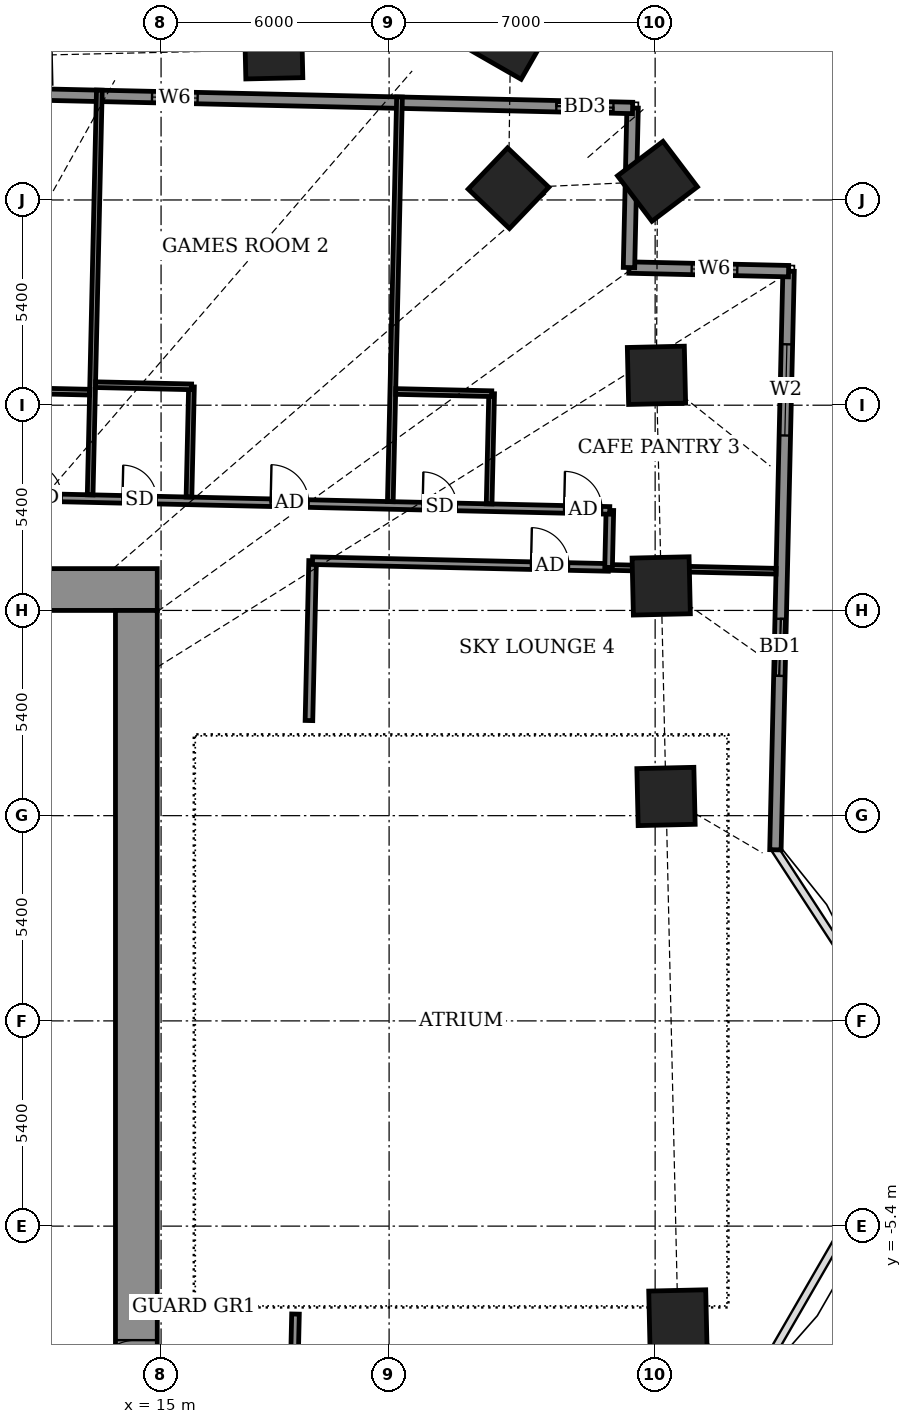
"""IFC4 building model, lengths in metres.
Left out: names, types, materials, properties, quantities, classifications, styles, units other than length and angle.
Written with IfcOpenShell. Run it as: python <this file> out.ifc"""

import sys

from ifc_helpers import new_model, si_unit, direction, frame, frame_2d, origin, origin_2d, place, context, subcontext, project, spatial, rectangle, extrude, element, fill, save


model = new_model("IFC4")
c1 = context("Model", 3, precision=1e-05, world=origin(), true_north=direction((0.0, 1.0)))
c2 = subcontext(c1, "Body", "Model", "MODEL_VIEW")
j1 = project(units=[si_unit("LENGTHUNIT", "METRE"), si_unit("PLANEANGLEUNIT", "RADIAN")], contexts=[c1])
p1 = place(None, origin())
s1 = spatial("IfcSite", under=j1, at=p1, CompositionType="ELEMENT")
p2 = place(p1, origin())
s2 = spatial("IfcBuilding", under=s1, at=p2, CompositionType="ELEMENT")
p3 = place(p2, frame((0.0, 0.0, 52.1)))
s3 = spatial("IfcBuildingStorey", under=s2, at=p3, CompositionType="ELEMENT", Elevation=52.1)
for number, where, z_axis, x_axis in (
    (1, (28.598, -7.842, -0.55), (0.0, 0.0, 1.0), (-0.023, 1.0, 0.0)),
    (2, (28.286, 5.905, -0.55), (0.0, 0.0, 1.0), (-0.023, 1.0, 0.0)),
    (3, (28.16, 11.445, -0.55), (0.0, 0.0, 1.0), (-0.023, 1.0, 0.0)),
    (4, (28.035, 16.986, -0.55), (0.0, 0.0, 1.0), (-0.023, 1.0, 0.0)),
    (5, (28.061, 22.09, -0.55), (0.0, 0.0, 1.0), (-0.604, 0.797, 0.0)),
    (6, (24.142, 21.91, -0.55), (0.0, 0.0, 1.0), (-0.723, 0.691, 0.0)),
    (7, (24.196, 25.8, -0.55), (0.0, 0.0, 1.0), (-0.868, 0.497, 0.0)),
    (8, (17.963, 25.551, -0.55), (0.0, 0.0, 1.0), (-1.0, -0.023, 0.0)),
):
    element("IfcColumn", number, at=place(p3, frame(where, z_axis=z_axis, x_axis=x_axis)), inside=s3, PredefinedType="COLUMN", context=c2, shape_type="SweptSolid", body=[
        extrude(rectangle(XDim=1.5, YDim=1.5, at=origin_2d()), origin(), (0.0, 0.0, 1.0), 4.6),
    ])
p4 = place(p3, frame((31.165, 4.502, 0.0), z_axis=(0.0, 0.0, 1.0), x_axis=(0.022716307128, 0.999741951401, 0.0)))
e9 = element("IfcWall", 9, at=p4, inside=s3, PredefinedType="SOLIDWALL", context=c2, shape_type="SweptSolid", body=[
    extrude(rectangle(XDim=15.229, YDim=0.3, at=frame_2d((7.615, 0.0))), origin(), (0.0, 0.0, 1.0), 2.45),
])
p5 = place(p4, frame((4.578, 0.0, 0.0)))
e10 = element("IfcOpeningElement", 10, at=p5, cuts=e9, PredefinedType="OPENING", context=c2, shape_type="SweptSolid", body=[
    extrude(rectangle(XDim=1.5, YDim=2.4, at=frame_2d((0.75, 1.2))), frame((0.0, 0.16, 0.0), z_axis=(0.0, -1.0, 0.0), x_axis=(1.0, 0.0, 0.0)), (0.0, 0.0, 1.0), 0.32),
])
p6 = place(p4, frame((10.904, 0.0, 0.9)))
e11 = element("IfcOpeningElement", 11, at=p6, cuts=e9, PredefinedType="OPENING", context=c2, shape_type="SweptSolid", body=[
    extrude(rectangle(XDim=2.4, YDim=1.5, at=frame_2d((1.2, 0.75))), frame((0.0, 0.16, 0.0), z_axis=(0.0, -1.0, 0.0), x_axis=(1.0, 0.0, 0.0)), (0.0, 0.0, 1.0), 0.32),
])
p7 = place(p3, frame((31.511, 19.727, 0.0), z_axis=(0.0, 0.0, 1.0), x_axis=(-0.999744320311, 0.022611811187, 0.0)))
e12 = element("IfcWall", 12, at=p7, inside=s3, PredefinedType="SOLIDWALL", context=c2, shape_type="SweptSolid", body=[
    extrude(rectangle(XDim=4.2, YDim=0.3, at=frame_2d((2.1, 0.0))), origin(), (0.0, 0.0, 1.0), 2.35),
])
p8 = place(p7, frame((1.35, 0.0, 0.5)))
e13 = element("IfcOpeningElement", 13, at=p8, cuts=e12, PredefinedType="OPENING", context=c2, shape_type="SweptSolid", body=[
    extrude(rectangle(XDim=1.2, YDim=1.1, at=frame_2d((0.6, 0.55))), frame((0.0, 0.16, 0.0), z_axis=(0.0, -1.0, 0.0), x_axis=(1.0, 0.0, 0.0)), (0.0, 0.0, 1.0), 0.32),
])
p9 = place(p3, frame((27.312, 19.822, 0.0), z_axis=(0.0, 0.0, 1.0), x_axis=(0.022611811187, 0.999744320311, 0.0)))
e14 = element("IfcWall", 14, at=p9, inside=s3, PredefinedType="SOLIDWALL", context=c2, shape_type="SweptSolid", body=[
    extrude(rectangle(XDim=4.2, YDim=0.3, at=frame_2d((2.1, 0.0))), origin(), (0.0, 0.0, 1.0), 2.35),
])
p10 = place(p3, frame((27.407, 24.021, 0.0), z_axis=(0.0, 0.0, 1.0), x_axis=(-0.999742614779, 0.02268709312, 0.0)))
e15 = element("IfcWall", 15, at=p10, inside=s3, PredefinedType="SOLIDWALL", context=c2, shape_type="SweptSolid", body=[
    extrude(rectangle(XDim=49.943, YDim=0.3, at=frame_2d((24.971, 0.0))), origin(), (0.0, 0.0, 1.0), 2.25),
])
p11 = place(p10, frame((0.506, 0.0, 0.0)))
e16 = element("IfcOpeningElement", 16, at=p11, cuts=e15, PredefinedType="OPENING", context=c2, shape_type="SweptSolid", body=[
    extrude(rectangle(XDim=1.5, YDim=2.0, at=frame_2d((0.75, 1.0))), frame((0.0, 0.16, 0.0), z_axis=(0.0, -1.0, 0.0), x_axis=(1.0, 0.0, 0.0)), (0.0, 0.0, 1.0), 0.32),
])
p12 = place(p10, frame((11.448, 0.0, 0.5)))
e17 = element("IfcOpeningElement", 17, at=p12, cuts=e15, PredefinedType="OPENING", context=c2, shape_type="SweptSolid", body=[
    extrude(rectangle(XDim=1.2, YDim=1.1, at=frame_2d((0.6, 0.55))), frame((0.0, 0.16, 0.0), z_axis=(0.0, -1.0, 0.0), x_axis=(1.0, 0.0, 0.0)), (0.0, 0.0, 1.0), 0.32),
])
p13 = place(p10, frame((18.804, 0.0, 0.5)))
e18 = element("IfcOpeningElement", 18, at=p13, cuts=e15, PredefinedType="OPENING", context=c2, shape_type="SweptSolid", body=[
    extrude(rectangle(XDim=1.2, YDim=1.1, at=frame_2d((0.6, 0.55))), frame((0.0, 0.16, 0.0), z_axis=(0.0, -1.0, 0.0), x_axis=(1.0, 0.0, 0.0)), (0.0, 0.0, 1.0), 0.32),
])
p14 = place(p10, frame((24.891, 0.0, 0.0)))
e19 = element("IfcOpeningElement", 19, at=p14, cuts=e15, PredefinedType="OPENING", context=c2, shape_type="SweptSolid", body=[
    extrude(rectangle(XDim=1.5, YDim=2.0, at=frame_2d((0.75, 1.0))), frame((0.0, 0.16, 0.0), z_axis=(0.0, -1.0, 0.0), x_axis=(1.0, 0.0, 0.0)), (0.0, 0.0, 1.0), 0.32),
])
p15 = place(p10, frame((30.75, 0.0, 0.0)))
e20 = element("IfcOpeningElement", 20, at=p15, cuts=e15, PredefinedType="OPENING", context=c2, shape_type="SweptSolid", body=[
    extrude(rectangle(XDim=1.5, YDim=2.0, at=frame_2d((0.75, 1.0))), frame((0.0, 0.16, 0.0), z_axis=(0.0, -1.0, 0.0), x_axis=(1.0, 0.0, 0.0)), (0.0, 0.0, 1.0), 0.32),
])
p16 = place(p10, frame((38.209, 0.0, 0.5)))
e21 = element("IfcOpeningElement", 21, at=p16, cuts=e15, PredefinedType="OPENING", context=c2, shape_type="SweptSolid", body=[
    extrude(rectangle(XDim=1.2, YDim=1.1, at=frame_2d((0.6, 0.55))), frame((0.0, 0.16, 0.0), z_axis=(0.0, -1.0, 0.0), x_axis=(1.0, 0.0, 0.0)), (0.0, 0.0, 1.0), 0.32),
])
p17 = place(p10, frame((45.277, 0.0, 0.5)))
e22 = element("IfcOpeningElement", 22, at=p17, cuts=e15, PredefinedType="OPENING", context=c2, shape_type="SweptSolid", body=[
    extrude(rectangle(XDim=1.2, YDim=1.1, at=frame_2d((0.6, 0.55))), frame((0.0, 0.16, 0.0), z_axis=(0.0, -1.0, 0.0), x_axis=(1.0, 0.0, 0.0)), (0.0, 0.0, 1.0), 0.32),
])
p18 = place(p3, frame((18.384, -14.434, 0.0), z_axis=(0.0, 0.0, 1.0), x_axis=(0.022773383809, 0.999740652864, 0.0)))
e23 = element("IfcWall", 23, at=p18, inside=s3, PredefinedType="PARTITIONING", context=c2, shape_type="SweptSolid", body=[
    extrude(rectangle(XDim=6.722, YDim=0.2, at=frame_2d((3.361, 0.0))), origin(), (0.0, 0.0, 1.0), 2.25),
])
p19 = place(p3, frame((18.891, 7.903, 0.0), z_axis=(0.0, 0.0, 1.0), x_axis=(0.022807092041, 0.999739884446, 0.0)))
e24 = element("IfcWall", 24, at=p19, inside=s3, PredefinedType="PARTITIONING", context=c2, shape_type="SweptSolid", body=[
    extrude(rectangle(XDim=4.207, YDim=0.2, at=frame_2d((2.104, 0.0))), origin(), (0.0, 0.0, 1.0), 2.45),
])
p20 = place(p3, frame((18.985, 12.109, 0.0), z_axis=(0.0, 0.0, 1.0), x_axis=(0.999741689867, -0.022727814278, 0.0)))
e25 = element("IfcWall", 25, at=p20, inside=s3, PredefinedType="PARTITIONING", context=c2, shape_type="SweptSolid", body=[
    extrude(rectangle(XDim=7.788, YDim=0.2, at=frame_2d((3.894, 0.0))), origin(), (0.0, 0.0, 1.0), 2.45),
])
p21 = place(p20, frame((5.75, 0.0, 0.0)))
e26 = element("IfcOpeningElement", 26, at=p21, cuts=e25, PredefinedType="OPENING", context=c2, shape_type="SweptSolid", body=[
    extrude(rectangle(XDim=1.0, YDim=2.1, at=frame_2d((0.5, 1.05))), frame((0.0, 0.11, 0.0), z_axis=(0.0, -1.0, 0.0), x_axis=(1.0, 0.0, 0.0)), (0.0, 0.0, 1.0), 0.22),
])
p22 = place(p3, frame((26.771, 11.932, 0.0), z_axis=(0.0, 0.0, 1.0), x_axis=(0.999743859858, -0.022632160219, 0.0)))
e27 = element("IfcWall", 27, at=p22, inside=s3, PredefinedType="PARTITIONING", context=c2, shape_type="SweptSolid", body=[
    extrude(rectangle(XDim=4.412, YDim=0.15, at=frame_2d((2.206, 0.0))), origin(), (0.0, 0.0, 1.0), 4.05),
])
p23 = place(p3, frame((26.775, 11.932, 0.0), z_axis=(0.0, 0.0, 1.0), x_axis=(0.022780545013, 0.999740489712, 0.0)))
e28 = element("IfcWall", 28, at=p23, inside=s3, PredefinedType="PARTITIONING", context=c2, shape_type="SweptSolid", body=[
    extrude(rectangle(XDim=1.5, YDim=0.2, at=frame_2d((0.75, 0.0))), origin(), (0.0, 0.0, 1.0), 4.05),
])
p24 = place(p3, frame((-26.206, 14.635, 0.0), z_axis=(0.0, 0.0, 1.0), x_axis=(0.999742550532, -0.022689924097, 0.0)))
e29 = element("IfcWall", 29, at=p24, inside=s3, PredefinedType="PARTITIONING", context=c2, shape_type="SweptSolid", body=[
    extrude(rectangle(XDim=53.025, YDim=0.2, at=frame_2d((26.512, 0.0))), origin(), (0.0, 0.0, 1.0), 2.1),
])
p25 = place(p24, frame((51.824, 0.0, 0.0)))
e30 = element("IfcOpeningElement", 30, at=p25, cuts=e29, PredefinedType="OPENING", context=c2, shape_type="SweptSolid", body=[
    extrude(rectangle(XDim=1.0, YDim=2.1, at=frame_2d((0.5, 1.05))), frame((0.0, 0.11, 0.0), z_axis=(0.0, -1.0, 0.0), x_axis=(1.0, 0.0, 0.0)), (0.0, 0.0, 1.0), 0.22),
])
p26 = place(p24, frame((48.1, 0.0, 0.0)))
e31 = element("IfcOpeningElement", 31, at=p26, cuts=e29, PredefinedType="OPENING", context=c2, shape_type="SweptSolid", body=[
    extrude(rectangle(XDim=0.9, YDim=2.1, at=frame_2d((0.45, 1.05))), frame((0.0, 0.11, 0.0), z_axis=(0.0, -1.0, 0.0), x_axis=(1.0, 0.0, 0.0)), (0.0, 0.0, 1.0), 0.22),
])
p27 = place(p24, frame((44.1, 0.0, 0.0)))
e32 = element("IfcOpeningElement", 32, at=p27, cuts=e29, PredefinedType="OPENING", context=c2, shape_type="SweptSolid", body=[
    extrude(rectangle(XDim=1.0, YDim=2.1, at=frame_2d((0.5, 1.05))), frame((0.0, 0.11, 0.0), z_axis=(0.0, -1.0, 0.0), x_axis=(1.0, 0.0, 0.0)), (0.0, 0.0, 1.0), 0.22),
])
p28 = place(p24, frame((40.2, 0.0, 0.0)))
e33 = element("IfcOpeningElement", 33, at=p28, cuts=e29, PredefinedType="OPENING", context=c2, shape_type="SweptSolid", body=[
    extrude(rectangle(XDim=0.9, YDim=2.1, at=frame_2d((0.45, 1.05))), frame((0.0, 0.11, 0.0), z_axis=(0.0, -1.0, 0.0), x_axis=(1.0, 0.0, 0.0)), (0.0, 0.0, 1.0), 0.22),
])
p29 = place(p24, frame((33.175, 0.0, 0.0)))
e34 = element("IfcOpeningElement", 34, at=p29, cuts=e29, PredefinedType="OPENING", context=c2, shape_type="SweptSolid", body=[
    extrude(rectangle(XDim=1.0, YDim=2.1, at=frame_2d((0.5, 1.05))), frame((0.0, 0.11, 0.0), z_axis=(0.0, -1.0, 0.0), x_axis=(1.0, 0.0, 0.0)), (0.0, 0.0, 1.0), 0.22),
])
p30 = place(p24, frame((37.7, 0.0, 0.0)))
e35 = element("IfcOpeningElement", 35, at=p30, cuts=e29, PredefinedType="OPENING", context=c2, shape_type="SweptSolid", body=[
    extrude(rectangle(XDim=0.9, YDim=2.1, at=frame_2d((0.45, 1.05))), frame((0.0, 0.11, 0.0), z_axis=(0.0, -1.0, 0.0), x_axis=(1.0, 0.0, 0.0)), (0.0, 0.0, 1.0), 0.22),
])
p31 = place(p24, frame((28.625, 0.0, 0.0)))
e36 = element("IfcOpeningElement", 36, at=p31, cuts=e29, PredefinedType="OPENING", context=c2, shape_type="SweptSolid", body=[
    extrude(rectangle(XDim=0.9, YDim=2.1, at=frame_2d((0.45, 1.05))), frame((0.0, 0.11, 0.0), z_axis=(0.0, -1.0, 0.0), x_axis=(1.0, 0.0, 0.0)), (0.0, 0.0, 1.0), 0.22),
])
p32 = place(p24, frame((21.15, 0.0, 0.0)))
e37 = element("IfcOpeningElement", 37, at=p32, cuts=e29, PredefinedType="OPENING", context=c2, shape_type="SweptSolid", body=[
    extrude(rectangle(XDim=0.9, YDim=2.1, at=frame_2d((0.45, 1.05))), frame((0.0, 0.11, 0.0), z_axis=(0.0, -1.0, 0.0), x_axis=(1.0, 0.0, 0.0)), (0.0, 0.0, 1.0), 0.22),
])
p33 = place(p24, frame((17.075, 0.0, 0.0)))
e38 = element("IfcOpeningElement", 38, at=p33, cuts=e29, PredefinedType="OPENING", context=c2, shape_type="SweptSolid", body=[
    extrude(rectangle(XDim=1.0, YDim=2.1, at=frame_2d((0.5, 1.05))), frame((0.0, 0.11, 0.0), z_axis=(0.0, -1.0, 0.0), x_axis=(1.0, 0.0, 0.0)), (0.0, 0.0, 1.0), 0.22),
])
p34 = place(p24, frame((13.15, 0.0, 0.0)))
e39 = element("IfcOpeningElement", 39, at=p34, cuts=e29, PredefinedType="OPENING", context=c2, shape_type="SweptSolid", body=[
    extrude(rectangle(XDim=0.9, YDim=2.1, at=frame_2d((0.45, 1.05))), frame((0.0, 0.11, 0.0), z_axis=(0.0, -1.0, 0.0), x_axis=(1.0, 0.0, 0.0)), (0.0, 0.0, 1.0), 0.22),
])
p35 = place(p24, frame((3.65, 0.0, 0.0)))
e40 = element("IfcOpeningElement", 40, at=p35, cuts=e29, PredefinedType="OPENING", context=c2, shape_type="SweptSolid", body=[
    extrude(rectangle(XDim=1.0, YDim=2.1, at=frame_2d((0.5, 1.05))), frame((0.0, 0.11, 0.0), z_axis=(0.0, -1.0, 0.0), x_axis=(1.0, 0.0, 0.0)), (0.0, 0.0, 1.0), 0.22),
])
p36 = place(p24, frame((10.55, 0.0, 0.0)))
e41 = element("IfcOpeningElement", 41, at=p36, cuts=e29, PredefinedType="OPENING", context=c2, shape_type="SweptSolid", body=[
    extrude(rectangle(XDim=0.9, YDim=2.1, at=frame_2d((0.45, 1.05))), frame((0.0, 0.11, 0.0), z_axis=(0.0, -1.0, 0.0), x_axis=(1.0, 0.0, 0.0)), (0.0, 0.0, 1.0), 0.22),
])
p37 = place(p3, frame((13.134, 13.842, 0.0), z_axis=(0.0, 0.0, 1.0), x_axis=(0.022716198383, 0.999741953872, 0.0)))
e42 = element("IfcWall", 42, at=p37, inside=s3, PredefinedType="PARTITIONING", context=c2, shape_type="SweptSolid", body=[
    extrude(rectangle(XDim=10.651, YDim=0.15, at=frame_2d((5.325, 0.0))), origin(), (0.0, 0.0, 1.0), 2.25),
])
p38 = place(p3, frame((15.734, 13.783, 0.0), z_axis=(0.0, 0.0, 1.0), x_axis=(0.022807433839, 0.999739876649, 0.0)))
e43 = element("IfcWall", 43, at=p38, inside=s3, PredefinedType="PARTITIONING", context=c2, shape_type="SweptSolid", body=[
    extrude(rectangle(XDim=2.901, YDim=0.15, at=frame_2d((1.45, 0.0))), origin(), (0.0, 0.0, 1.0), 2.45),
])
p39 = place(p3, frame((21.032, 13.663, 0.0), z_axis=(0.0, 0.0, 1.0), x_axis=(0.022718280885, 0.999741906551, 0.0)))
e44 = element("IfcWall", 44, at=p39, inside=s3, PredefinedType="PARTITIONING", context=c2, shape_type="SweptSolid", body=[
    extrude(rectangle(XDim=10.65, YDim=0.15, at=frame_2d((5.325, 0.0))), origin(), (0.0, 0.0, 1.0), 2.25),
])
p40 = place(p3, frame((23.632, 13.604, 0.0), z_axis=(0.0, 0.0, 1.0), x_axis=(0.022732880677, 0.999741574676, 0.0)))
e45 = element("IfcWall", 45, at=p40, inside=s3, PredefinedType="PARTITIONING", context=c2, shape_type="SweptSolid", body=[
    extrude(rectangle(XDim=2.9, YDim=0.15, at=frame_2d((1.45, 0.0))), origin(), (0.0, 0.0, 1.0), 2.45),
])
p41 = place(p3, frame((10.798, 16.596, 0.0), z_axis=(0.0, 0.0, 1.0), x_axis=(0.999740478815, -0.022781023197, 0.0)))
e46 = element("IfcWall", 46, at=p41, inside=s3, PredefinedType="PARTITIONING", context=c2, shape_type="SweptSolid", body=[
    extrude(rectangle(XDim=2.325, YDim=0.15, at=frame_2d((1.163, 0.0))), origin(), (0.0, 0.0, 1.0), 4.05),
])
p42 = place(p3, frame((13.277, 16.74, 0.0), z_axis=(0.0, 0.0, 1.0), x_axis=(0.999746307581, -0.022523775833, 0.0)))
e47 = element("IfcWall", 47, at=p42, inside=s3, PredefinedType="PARTITIONING", context=c2, shape_type="SweptSolid", body=[
    extrude(rectangle(XDim=2.526, YDim=0.15, at=frame_2d((1.263, 0.0))), origin(), (0.0, 0.0, 1.0), 2.25),
])
p43 = place(p3, frame((21.175, 16.561, 0.0), z_axis=(0.0, 0.0, 1.0), x_axis=(0.999735307039, -0.023006865507, 0.0)))
e48 = element("IfcWall", 48, at=p43, inside=s3, PredefinedType="PARTITIONING", context=c2, shape_type="SweptSolid", body=[
    extrude(rectangle(XDim=2.526, YDim=0.15, at=frame_2d((1.263, 0.0))), origin(), (0.0, 0.0, 1.0), 2.45),
])
p44 = place(p3, frame((-14.9, 11.35, 0.0), z_axis=(0.0, 0.0, 1.0), x_axis=(1.0, 0.0, 0.0)))
e49 = element("IfcWall", 49, at=p44, inside=s3, PredefinedType="SHEAR", context=c2, shape_type="SweptSolid", body=[
    extrude(rectangle(XDim=29.8, YDim=1.1, at=frame_2d((14.9, 0.0))), origin(), (0.0, 0.0, 1.0), 4.6),
])
p45 = place(p3, frame((14.35, -10.8, 0.0), z_axis=(0.0, 0.0, 1.0), x_axis=(0.0, 1.0, 0.0)))
e50 = element("IfcWall", 50, at=p45, inside=s3, PredefinedType="SHEAR", context=c2, shape_type="SweptSolid", body=[
    extrude(rectangle(XDim=21.6, YDim=1.1, at=frame_2d((10.8, 0.0))), origin(), (0.0, 0.0, 1.0), 4.6),
])
p46 = place(p45, frame((1.2, 0.0, 0.0)))
e51 = element("IfcOpeningElement", 51, at=p46, cuts=e50, PredefinedType="OPENING", context=c2, shape_type="SweptSolid", body=[
    extrude(rectangle(XDim=1.2, YDim=2.1, at=frame_2d((0.6, 1.05))), frame((0.0, 0.56, 0.0), z_axis=(0.0, -1.0, 0.0), x_axis=(1.0, 0.0, 0.0)), (0.0, 0.0, 1.0), 1.12),
])
p47 = place(p5, origin())
e52 = element("IfcDoor", 52, at=p47, inside=s3, OperationType="SLIDING_TO_LEFT", PredefinedType="DOOR", context=c2, shape_type="SweptSolid", body=[
    extrude(rectangle(XDim=1.5, YDim=2.4, at=frame_2d((0.75, 1.2))), frame((0.0, 0.025, 0.0), z_axis=(0.0, -1.0, 0.0), x_axis=(1.0, 0.0, 0.0)), (0.0, 0.0, 1.0), 0.05),
])
fill(e10, e52)
p48 = place(p6, origin())
e53 = element("IfcWindow", 53, at=p48, inside=s3, PartitioningType="DOUBLE_PANEL_VERTICAL", PredefinedType="WINDOW", context=c2, shape_type="SweptSolid", body=[
    extrude(rectangle(XDim=2.4, YDim=1.5, at=frame_2d((1.2, 0.75))), frame((0.0, 0.03, 0.0), z_axis=(0.0, -1.0, 0.0), x_axis=(1.0, 0.0, 0.0)), (0.0, 0.0, 1.0), 0.06),
])
fill(e11, e53)
p49 = place(p8, origin())
e54 = element("IfcWindow", 54, at=p49, inside=s3, PartitioningType="SINGLE_PANEL", PredefinedType="WINDOW", context=c2, shape_type="SweptSolid", body=[
    extrude(rectangle(XDim=1.2, YDim=1.1, at=frame_2d((0.6, 0.55))), frame((0.0, 0.03, 0.0), z_axis=(0.0, -1.0, 0.0), x_axis=(1.0, 0.0, 0.0)), (0.0, 0.0, 1.0), 0.06),
])
fill(e13, e54)
p50 = place(p11, origin())
e55 = element("IfcDoor", 55, at=p50, inside=s3, OperationType="SLIDING_TO_LEFT", PredefinedType="DOOR", context=c2, shape_type="SweptSolid", body=[
    extrude(rectangle(XDim=1.5, YDim=2.0, at=frame_2d((0.75, 1.0))), frame((0.0, 0.025, 0.0), z_axis=(0.0, -1.0, 0.0), x_axis=(1.0, 0.0, 0.0)), (0.0, 0.0, 1.0), 0.05),
])
fill(e16, e55)
p51 = place(p12, origin())
e56 = element("IfcWindow", 56, at=p51, inside=s3, PartitioningType="SINGLE_PANEL", PredefinedType="WINDOW", context=c2, shape_type="SweptSolid", body=[
    extrude(rectangle(XDim=1.2, YDim=1.1, at=frame_2d((0.6, 0.55))), frame((0.0, 0.03, 0.0), z_axis=(0.0, -1.0, 0.0), x_axis=(1.0, 0.0, 0.0)), (0.0, 0.0, 1.0), 0.06),
])
fill(e17, e56)
p52 = place(p21, origin())
e57 = element("IfcDoor", 57, at=p52, inside=s3, OperationType="SINGLE_SWING_LEFT", PredefinedType="DOOR", context=c2, shape_type="SweptSolid", body=[
    extrude(rectangle(XDim=1.0, YDim=2.1, at=frame_2d((0.5, 1.05))), frame((0.0, 0.025, 0.0), z_axis=(0.0, -1.0, 0.0), x_axis=(1.0, 0.0, 0.0)), (0.0, 0.0, 1.0), 0.05),
])
fill(e26, e57)
p53 = place(p25, origin())
e58 = element("IfcDoor", 58, at=p53, inside=s3, OperationType="SINGLE_SWING_RIGHT", PredefinedType="DOOR", context=c2, shape_type="SweptSolid", body=[
    extrude(rectangle(XDim=1.0, YDim=2.1, at=frame_2d((0.5, 1.05))), frame((0.0, 0.025, 0.0), z_axis=(0.0, -1.0, 0.0), x_axis=(1.0, 0.0, 0.0)), (0.0, 0.0, 1.0), 0.05),
])
fill(e30, e58)
p54 = place(p26, origin())
e59 = element("IfcDoor", 59, at=p54, inside=s3, OperationType="SINGLE_SWING_LEFT", PredefinedType="DOOR", context=c2, shape_type="SweptSolid", body=[
    extrude(rectangle(XDim=0.9, YDim=2.1, at=frame_2d((0.45, 1.05))), frame((0.0, 0.025, 0.0), z_axis=(0.0, -1.0, 0.0), x_axis=(1.0, 0.0, 0.0)), (0.0, 0.0, 1.0), 0.05),
])
fill(e31, e59)
p55 = place(p27, origin())
e60 = element("IfcDoor", 60, at=p55, inside=s3, OperationType="SINGLE_SWING_LEFT", PredefinedType="DOOR", context=c2, shape_type="SweptSolid", body=[
    extrude(rectangle(XDim=1.0, YDim=2.1, at=frame_2d((0.5, 1.05))), frame((0.0, 0.025, 0.0), z_axis=(0.0, -1.0, 0.0), x_axis=(1.0, 0.0, 0.0)), (0.0, 0.0, 1.0), 0.05),
])
fill(e32, e60)
p56 = place(p28, origin())
e61 = element("IfcDoor", 61, at=p56, inside=s3, OperationType="SINGLE_SWING_RIGHT", PredefinedType="DOOR", context=c2, shape_type="SweptSolid", body=[
    extrude(rectangle(XDim=0.9, YDim=2.1, at=frame_2d((0.45, 1.05))), frame((0.0, 0.025, 0.0), z_axis=(0.0, -1.0, 0.0), x_axis=(1.0, 0.0, 0.0)), (0.0, 0.0, 1.0), 0.05),
])
fill(e33, e61)
p57 = place(p30, origin())
e62 = element("IfcDoor", 62, at=p57, inside=s3, OperationType="SINGLE_SWING_LEFT", PredefinedType="DOOR", context=c2, shape_type="SweptSolid", body=[
    extrude(rectangle(XDim=0.9, YDim=2.1, at=frame_2d((0.45, 1.05))), frame((0.0, 0.025, 0.0), z_axis=(0.0, -1.0, 0.0), x_axis=(1.0, 0.0, 0.0)), (0.0, 0.0, 1.0), 0.05),
])
fill(e35, e62)
p58 = place(p46, origin())
e63 = element("IfcDoor", 63, at=p58, inside=s3, OperationType="DOUBLE_DOOR_SINGLE_SWING", PredefinedType="DOOR", context=c2, shape_type="SweptSolid", body=[
    extrude(rectangle(XDim=1.2, YDim=2.1, at=frame_2d((0.6, 1.05))), frame((0.0, 0.025, 0.0), z_axis=(0.0, -1.0, 0.0), x_axis=(1.0, 0.0, 0.0)), (0.0, 0.0, 1.0), 0.05),
])
fill(e51, e63)
save(model, sys.argv[1])
